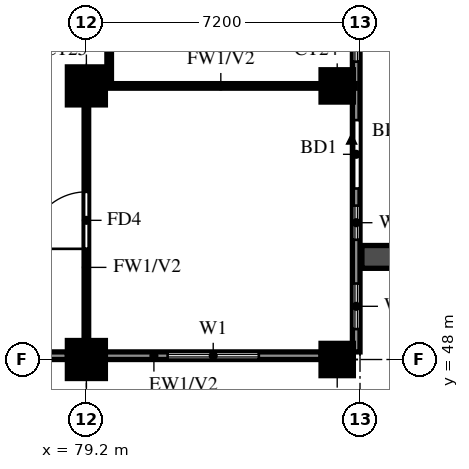
"""IFC4 building model, lengths in metres.
Left out: names, types, materials, properties, quantities, classifications, styles, units other than length and angle.
Written with IfcOpenShell. Run it as: python <this file> out.ifc"""

import sys

from ifc_helpers import new_model, si_unit, direction, frame, frame_2d, origin, origin_2d, place, context, subcontext, project, spatial, rectangle, extrude, source, transform, mapped, element, fill, save


model = new_model("IFC4")
c1 = context("Model", 3, precision=1e-05, world=origin(), true_north=direction((0.0, 1.0)))
c2 = subcontext(c1, "Body", "Model", "MODEL_VIEW")
j1 = project(units=[si_unit("LENGTHUNIT", "METRE"), si_unit("PLANEANGLEUNIT", "RADIAN")], contexts=[c1])
p1 = place(None, origin())
s1 = spatial("IfcSite", under=j1, at=p1, CompositionType="ELEMENT")
p2 = place(p1, origin())
s2 = spatial("IfcBuilding", under=s1, at=p2, CompositionType="ELEMENT")
p3 = place(p2, frame((0.0, 0.0, 167.5)))
s3 = spatial("IfcBuildingStorey", under=s2, at=p3, CompositionType="ELEMENT", Elevation=167.5)
m1 = source(origin(), c2, "Body", "SweptSolid", [
    extrude(rectangle(XDim=1.0, YDim=1.0, at=origin_2d()), origin(), (0.0, 0.0, 1.0), 3.2),
])
p4 = place(p3, frame((79.2, 48.0, 0.0), z_axis=(0.0, 0.0, 1.0), x_axis=(1.0, 0.0, 0.0)))
e1 = element("IfcColumn", 1, at=p4, inside=s3, PredefinedType="COLUMN", context=c2, shape_type="MappedRepresentation", body=[
    mapped(m1, transform((0.0, 0.0, 0.0))),
])
m2 = source(origin(), c2, "Body", "SweptSolid", [
    extrude(rectangle(XDim=0.85, YDim=0.85, at=origin_2d()), origin(), (0.0, 0.0, 1.0), 3.2),
])
p5 = place(p3, frame((85.8, 48.0, 0.0), z_axis=(0.0, 0.0, 1.0), x_axis=(1.0, 0.0, 0.0)))
e2 = element("IfcColumn", 2, at=p5, inside=s3, PredefinedType="COLUMN", context=c2, shape_type="MappedRepresentation", body=[
    mapped(m2, transform((0.0, 0.0, 0.0))),
])
p6 = place(p3, frame((79.2, 55.2, 0.0), z_axis=(0.0, 0.0, 1.0), x_axis=(1.0, 0.0, 0.0)))
e3 = element("IfcColumn", 3, at=p6, inside=s3, PredefinedType="COLUMN", context=c2, shape_type="MappedRepresentation", body=[
    mapped(m1, transform((0.0, 0.0, 0.0))),
])
p7 = place(p3, frame((85.8, 55.2, 0.0), z_axis=(0.0, 0.0, 1.0), x_axis=(1.0, 0.0, 0.0)))
e4 = element("IfcColumn", 4, at=p7, inside=s3, PredefinedType="COLUMN", context=c2, shape_type="MappedRepresentation", body=[
    mapped(m2, transform((0.0, 0.0, 0.0))),
])
p8 = place(p3, frame((85.719, 39.881, 0.0), z_axis=(0.0, 0.0, 1.0), x_axis=(-0.86377618652, 0.503875678716, 0.0)))
e5 = element("IfcWall", 5, at=p8, inside=s3, PredefinedType="SOLIDWALL", context=c2, shape_type="SweptSolid", body=[
    extrude(rectangle(XDim=16.311, YDim=0.2, at=frame_2d((8.156, 0.0))), origin(), (0.0, 0.0, 1.0), 3.2),
])
p9 = place(p8, frame((13.326, 0.0, 1.5)))
e6 = element("IfcOpeningElement", 6, at=p9, cuts=e5, PredefinedType="OPENING", context=c2, shape_type="SweptSolid", body=[
    extrude(rectangle(XDim=0.9, YDim=0.9, at=frame_2d((0.45, 0.45))), frame((0.0, 0.11, 0.0), z_axis=(0.0, -1.0, 0.0), x_axis=(1.0, 0.0, 0.0)), (0.0, 0.0, 1.0), 0.22),
])
p10 = place(p3, frame((71.99, 48.1, 0.0), z_axis=(0.0, 0.0, 1.0), x_axis=(1.0, 0.0, 0.0)))
e7 = element("IfcWall", 7, at=p10, inside=s3, PredefinedType="SOLIDWALL", context=c2, shape_type="SweptSolid", body=[
    extrude(rectangle(XDim=6.71, YDim=0.2, at=frame_2d((3.355, 0.0))), origin(), (0.0, 0.0, 1.0), 3.2),
])
p11 = place(p3, frame((79.7, 48.1, 0.0), z_axis=(0.0, 0.0, 1.0), x_axis=(1.0, 0.0, 0.0)))
e8 = element("IfcWall", 8, at=p11, inside=s3, PredefinedType="SOLIDWALL", context=c2, shape_type="SweptSolid", body=[
    extrude(rectangle(XDim=5.675, YDim=0.2, at=frame_2d((2.837, 0.0))), origin(), (0.0, 0.0, 1.0), 3.2),
])
p12 = place(p11, frame((1.637, 0.0, 0.6)))
e9 = element("IfcOpeningElement", 9, at=p12, cuts=e8, PredefinedType="OPENING", context=c2, shape_type="SweptSolid", body=[
    extrude(rectangle(XDim=2.4, YDim=2.4, at=frame_2d((1.2, 1.2))), frame((0.0, 0.11, 0.0), z_axis=(0.0, -1.0, 0.0), x_axis=(1.0, 0.0, 0.0)), (0.0, 0.0, 1.0), 0.22),
])
p13 = place(p3, frame((86.3, 48.2, 0.0), z_axis=(0.0, 0.0, 1.0), x_axis=(0.0, 1.0, 0.0)))
e10 = element("IfcWall", 10, at=p13, inside=s3, PredefinedType="SOLIDWALL", context=c2, shape_type="SweptSolid", body=[
    extrude(rectangle(XDim=28.6, YDim=0.2, at=frame_2d((14.3, 0.0))), origin(), (0.0, 0.0, 1.0), 3.2),
])
p14 = place(p13, frame((4.3, 0.0, 0.0)))
e11 = element("IfcOpeningElement", 11, at=p14, cuts=e10, PredefinedType="OPENING", context=c2, shape_type="SweptSolid", body=[
    extrude(rectangle(XDim=1.8, YDim=2.4, at=frame_2d((0.9, 1.2))), frame((0.0, 0.11, 0.0), z_axis=(0.0, -1.0, 0.0), x_axis=(1.0, 0.0, 0.0)), (0.0, 0.0, 1.0), 0.22),
])
p15 = place(p13, frame((18.7, 0.0, 0.0)))
e12 = element("IfcOpeningElement", 12, at=p15, cuts=e10, PredefinedType="OPENING", context=c2, shape_type="SweptSolid", body=[
    extrude(rectangle(XDim=1.8, YDim=2.4, at=frame_2d((0.9, 1.2))), frame((0.0, 0.11, 0.0), z_axis=(0.0, -1.0, 0.0), x_axis=(1.0, 0.0, 0.0)), (0.0, 0.0, 1.0), 0.22),
])
p16 = place(p13, frame((0.6, 0.0, 0.6)))
e13 = element("IfcOpeningElement", 13, at=p16, cuts=e10, PredefinedType="OPENING", context=c2, shape_type="SweptSolid", body=[
    extrude(rectangle(XDim=1.2, YDim=2.4, at=frame_2d((0.6, 1.2))), frame((0.0, 0.11, 0.0), z_axis=(0.0, -1.0, 0.0), x_axis=(1.0, 0.0, 0.0)), (0.0, 0.0, 1.0), 0.22),
])
p17 = place(p13, frame((2.95, 0.0, 0.6)))
e14 = element("IfcOpeningElement", 14, at=p17, cuts=e10, PredefinedType="OPENING", context=c2, shape_type="SweptSolid", body=[
    extrude(rectangle(XDim=0.9, YDim=2.4, at=frame_2d((0.45, 1.2))), frame((0.0, 0.11, 0.0), z_axis=(0.0, -1.0, 0.0), x_axis=(1.0, 0.0, 0.0)), (0.0, 0.0, 1.0), 0.22),
])
p18 = place(p13, frame((11.012, 0.0, 0.6)))
e15 = element("IfcOpeningElement", 15, at=p18, cuts=e10, PredefinedType="OPENING", context=c2, shape_type="SweptSolid", body=[
    extrude(rectangle(XDim=2.4, YDim=2.4, at=frame_2d((1.2, 1.2))), frame((0.0, 0.11, 0.0), z_axis=(0.0, -1.0, 0.0), x_axis=(1.0, 0.0, 0.0)), (0.0, 0.0, 1.0), 0.22),
])
p19 = place(p13, frame((7.637, 0.0, 1.5)))
e16 = element("IfcOpeningElement", 16, at=p19, cuts=e10, PredefinedType="OPENING", context=c2, shape_type="SweptSolid", body=[
    extrude(rectangle(XDim=0.9, YDim=0.9, at=frame_2d((0.45, 0.45))), frame((0.0, 0.11, 0.0), z_axis=(0.0, -1.0, 0.0), x_axis=(1.0, 0.0, 0.0)), (0.0, 0.0, 1.0), 0.22),
])
p20 = place(p13, frame((9.55, 0.0, 1.5)))
e17 = element("IfcOpeningElement", 17, at=p20, cuts=e10, PredefinedType="OPENING", context=c2, shape_type="SweptSolid", body=[
    extrude(rectangle(XDim=0.9, YDim=0.9, at=frame_2d((0.45, 0.45))), frame((0.0, 0.11, 0.0), z_axis=(0.0, -1.0, 0.0), x_axis=(1.0, 0.0, 0.0)), (0.0, 0.0, 1.0), 0.22),
])
p21 = place(p13, frame((14.688, 0.0, 0.6)))
e18 = element("IfcOpeningElement", 18, at=p21, cuts=e10, PredefinedType="OPENING", context=c2, shape_type="SweptSolid", body=[
    extrude(rectangle(XDim=1.8, YDim=2.4, at=frame_2d((0.9, 1.2))), frame((0.0, 0.11, 0.0), z_axis=(0.0, -1.0, 0.0), x_axis=(1.0, 0.0, 0.0)), (0.0, 0.0, 1.0), 0.22),
])
p22 = place(p13, frame((22.038, 0.0, 1.5)))
e19 = element("IfcOpeningElement", 19, at=p22, cuts=e10, PredefinedType="OPENING", context=c2, shape_type="SweptSolid", body=[
    extrude(rectangle(XDim=0.9, YDim=0.9, at=frame_2d((0.45, 0.45))), frame((0.0, 0.11, 0.0), z_axis=(0.0, -1.0, 0.0), x_axis=(1.0, 0.0, 0.0)), (0.0, 0.0, 1.0), 0.22),
])
p23 = place(p13, frame((23.95, 0.0, 1.5)))
e20 = element("IfcOpeningElement", 20, at=p23, cuts=e10, PredefinedType="OPENING", context=c2, shape_type="SweptSolid", body=[
    extrude(rectangle(XDim=0.9, YDim=0.9, at=frame_2d((0.45, 0.45))), frame((0.0, 0.11, 0.0), z_axis=(0.0, -1.0, 0.0), x_axis=(1.0, 0.0, 0.0)), (0.0, 0.0, 1.0), 0.22),
])
p24 = place(p13, frame((25.413, 0.0, 0.6)))
e21 = element("IfcOpeningElement", 21, at=p24, cuts=e10, PredefinedType="OPENING", context=c2, shape_type="SweptSolid", body=[
    extrude(rectangle(XDim=2.4, YDim=2.4, at=frame_2d((1.2, 1.2))), frame((0.0, 0.11, 0.0), z_axis=(0.0, -1.0, 0.0), x_axis=(1.0, 0.0, 0.0)), (0.0, 0.0, 1.0), 0.22),
])
p25 = place(p3, frame((86.45, 50.7, 0.0), z_axis=(0.0, 0.0, 1.0), x_axis=(1.0, 0.0, 0.0)))
e22 = element("IfcWall", 22, at=p25, inside=s3, PredefinedType="SOLIDWALL", context=c2, shape_type="SweptSolid", body=[
    extrude(rectangle(XDim=2.65, YDim=0.6, at=frame_2d((1.325, 0.0))), origin(), (0.0, 0.0, 1.0), 2.85),
])
p26 = place(p3, frame((79.2, 55.2, 0.0), z_axis=(0.0, 0.0, 1.0), x_axis=(1.0, 0.0, 0.0)))
e23 = element("IfcWall", 23, at=p26, inside=s3, PredefinedType="PARTITIONING", context=c2, shape_type="SweptSolid", body=[
    extrude(rectangle(XDim=7.075, YDim=0.12, at=frame_2d((3.538, 0.0))), origin(), (0.0, 0.0, 1.0), 3.2),
])
p27 = place(p3, frame((79.2, 48.125, 0.0), z_axis=(0.0, 0.0, 1.0), x_axis=(0.0, 1.0, 0.0)))
e24 = element("IfcWall", 24, at=p27, inside=s3, PredefinedType="PARTITIONING", context=c2, shape_type="SweptSolid", body=[
    extrude(rectangle(XDim=7.075, YDim=0.12, at=frame_2d((3.538, 0.0))), origin(), (0.0, 0.0, 1.0), 3.2),
])
p28 = place(p27, frame((2.788, 0.0, 0.0)))
e25 = element("IfcOpeningElement", 25, at=p28, cuts=e24, PredefinedType="OPENING", context=c2, shape_type="SweptSolid", body=[
    extrude(rectangle(XDim=1.5, YDim=2.1, at=frame_2d((0.75, 1.05))), frame((0.0, 0.07, 0.0), z_axis=(0.0, -1.0, 0.0), x_axis=(1.0, 0.0, 0.0)), (0.0, 0.0, 1.0), 0.14),
])
p29 = place(p3, frame((79.8, 55.2, 0.0), z_axis=(0.0, 0.0, 1.0), x_axis=(0.0, 1.0, 0.0)))
e26 = element("IfcWall", 26, at=p29, inside=s3, PredefinedType="PARTITIONING", context=c2, shape_type="SweptSolid", body=[
    extrude(rectangle(XDim=3.6, YDim=0.12, at=frame_2d((1.8, 0.0))), origin(), (0.0, 0.0, 1.0), 3.2),
])
p30 = place(p12, origin())
e27 = element("IfcWindow", 27, at=p30, inside=s3, PartitioningType="DOUBLE_PANEL_VERTICAL", PredefinedType="WINDOW", context=c2, shape_type="SweptSolid", body=[
    extrude(rectangle(XDim=2.4, YDim=2.4, at=frame_2d((1.2, 1.2))), frame((0.0, 0.03, 0.0), z_axis=(0.0, -1.0, 0.0), x_axis=(1.0, 0.0, 0.0)), (0.0, 0.0, 1.0), 0.06),
])
fill(e9, e27)
p31 = place(p14, origin())
e28 = element("IfcDoor", 28, at=p31, inside=s3, OperationType="DOUBLE_DOOR_SLIDING", PredefinedType="DOOR", context=c2, shape_type="SweptSolid", body=[
    extrude(rectangle(XDim=1.8, YDim=2.4, at=frame_2d((0.9, 1.2))), frame((0.0, 0.025, 0.0), z_axis=(0.0, -1.0, 0.0), x_axis=(1.0, 0.0, 0.0)), (0.0, 0.0, 1.0), 0.05),
])
fill(e11, e28)
p32 = place(p16, origin())
e29 = element("IfcWindow", 29, at=p32, inside=s3, PartitioningType="SINGLE_PANEL", PredefinedType="WINDOW", context=c2, shape_type="SweptSolid", body=[
    extrude(rectangle(XDim=1.2, YDim=2.4, at=frame_2d((0.6, 1.2))), frame((0.0, 0.03, 0.0), z_axis=(0.0, -1.0, 0.0), x_axis=(1.0, 0.0, 0.0)), (0.0, 0.0, 1.0), 0.06),
])
fill(e13, e29)
p33 = place(p17, origin())
e30 = element("IfcWindow", 30, at=p33, inside=s3, PartitioningType="SINGLE_PANEL", PredefinedType="WINDOW", context=c2, shape_type="SweptSolid", body=[
    extrude(rectangle(XDim=0.9, YDim=2.4, at=frame_2d((0.45, 1.2))), frame((0.0, 0.03, 0.0), z_axis=(0.0, -1.0, 0.0), x_axis=(1.0, 0.0, 0.0)), (0.0, 0.0, 1.0), 0.06),
])
fill(e14, e30)
p34 = place(p19, origin())
e31 = element("IfcWindow", 31, at=p34, inside=s3, PartitioningType="SINGLE_PANEL", PredefinedType="WINDOW", context=c2, shape_type="SweptSolid", body=[
    extrude(rectangle(XDim=0.9, YDim=0.9, at=frame_2d((0.45, 0.45))), frame((0.0, 0.03, 0.0), z_axis=(0.0, -1.0, 0.0), x_axis=(1.0, 0.0, 0.0)), (0.0, 0.0, 1.0), 0.06),
])
fill(e16, e31)
p35 = place(p28, origin())
e32 = element("IfcDoor", 32, at=p35, inside=s3, OperationType="SINGLE_SWING_RIGHT", PredefinedType="DOOR", context=c2, shape_type="SweptSolid", body=[
    extrude(rectangle(XDim=1.5, YDim=2.1, at=frame_2d((0.75, 1.05))), frame((0.0, 0.025, 0.0), z_axis=(0.0, -1.0, 0.0), x_axis=(1.0, 0.0, 0.0)), (0.0, 0.0, 1.0), 0.05),
])
fill(e25, e32)
save(model, sys.argv[1])
